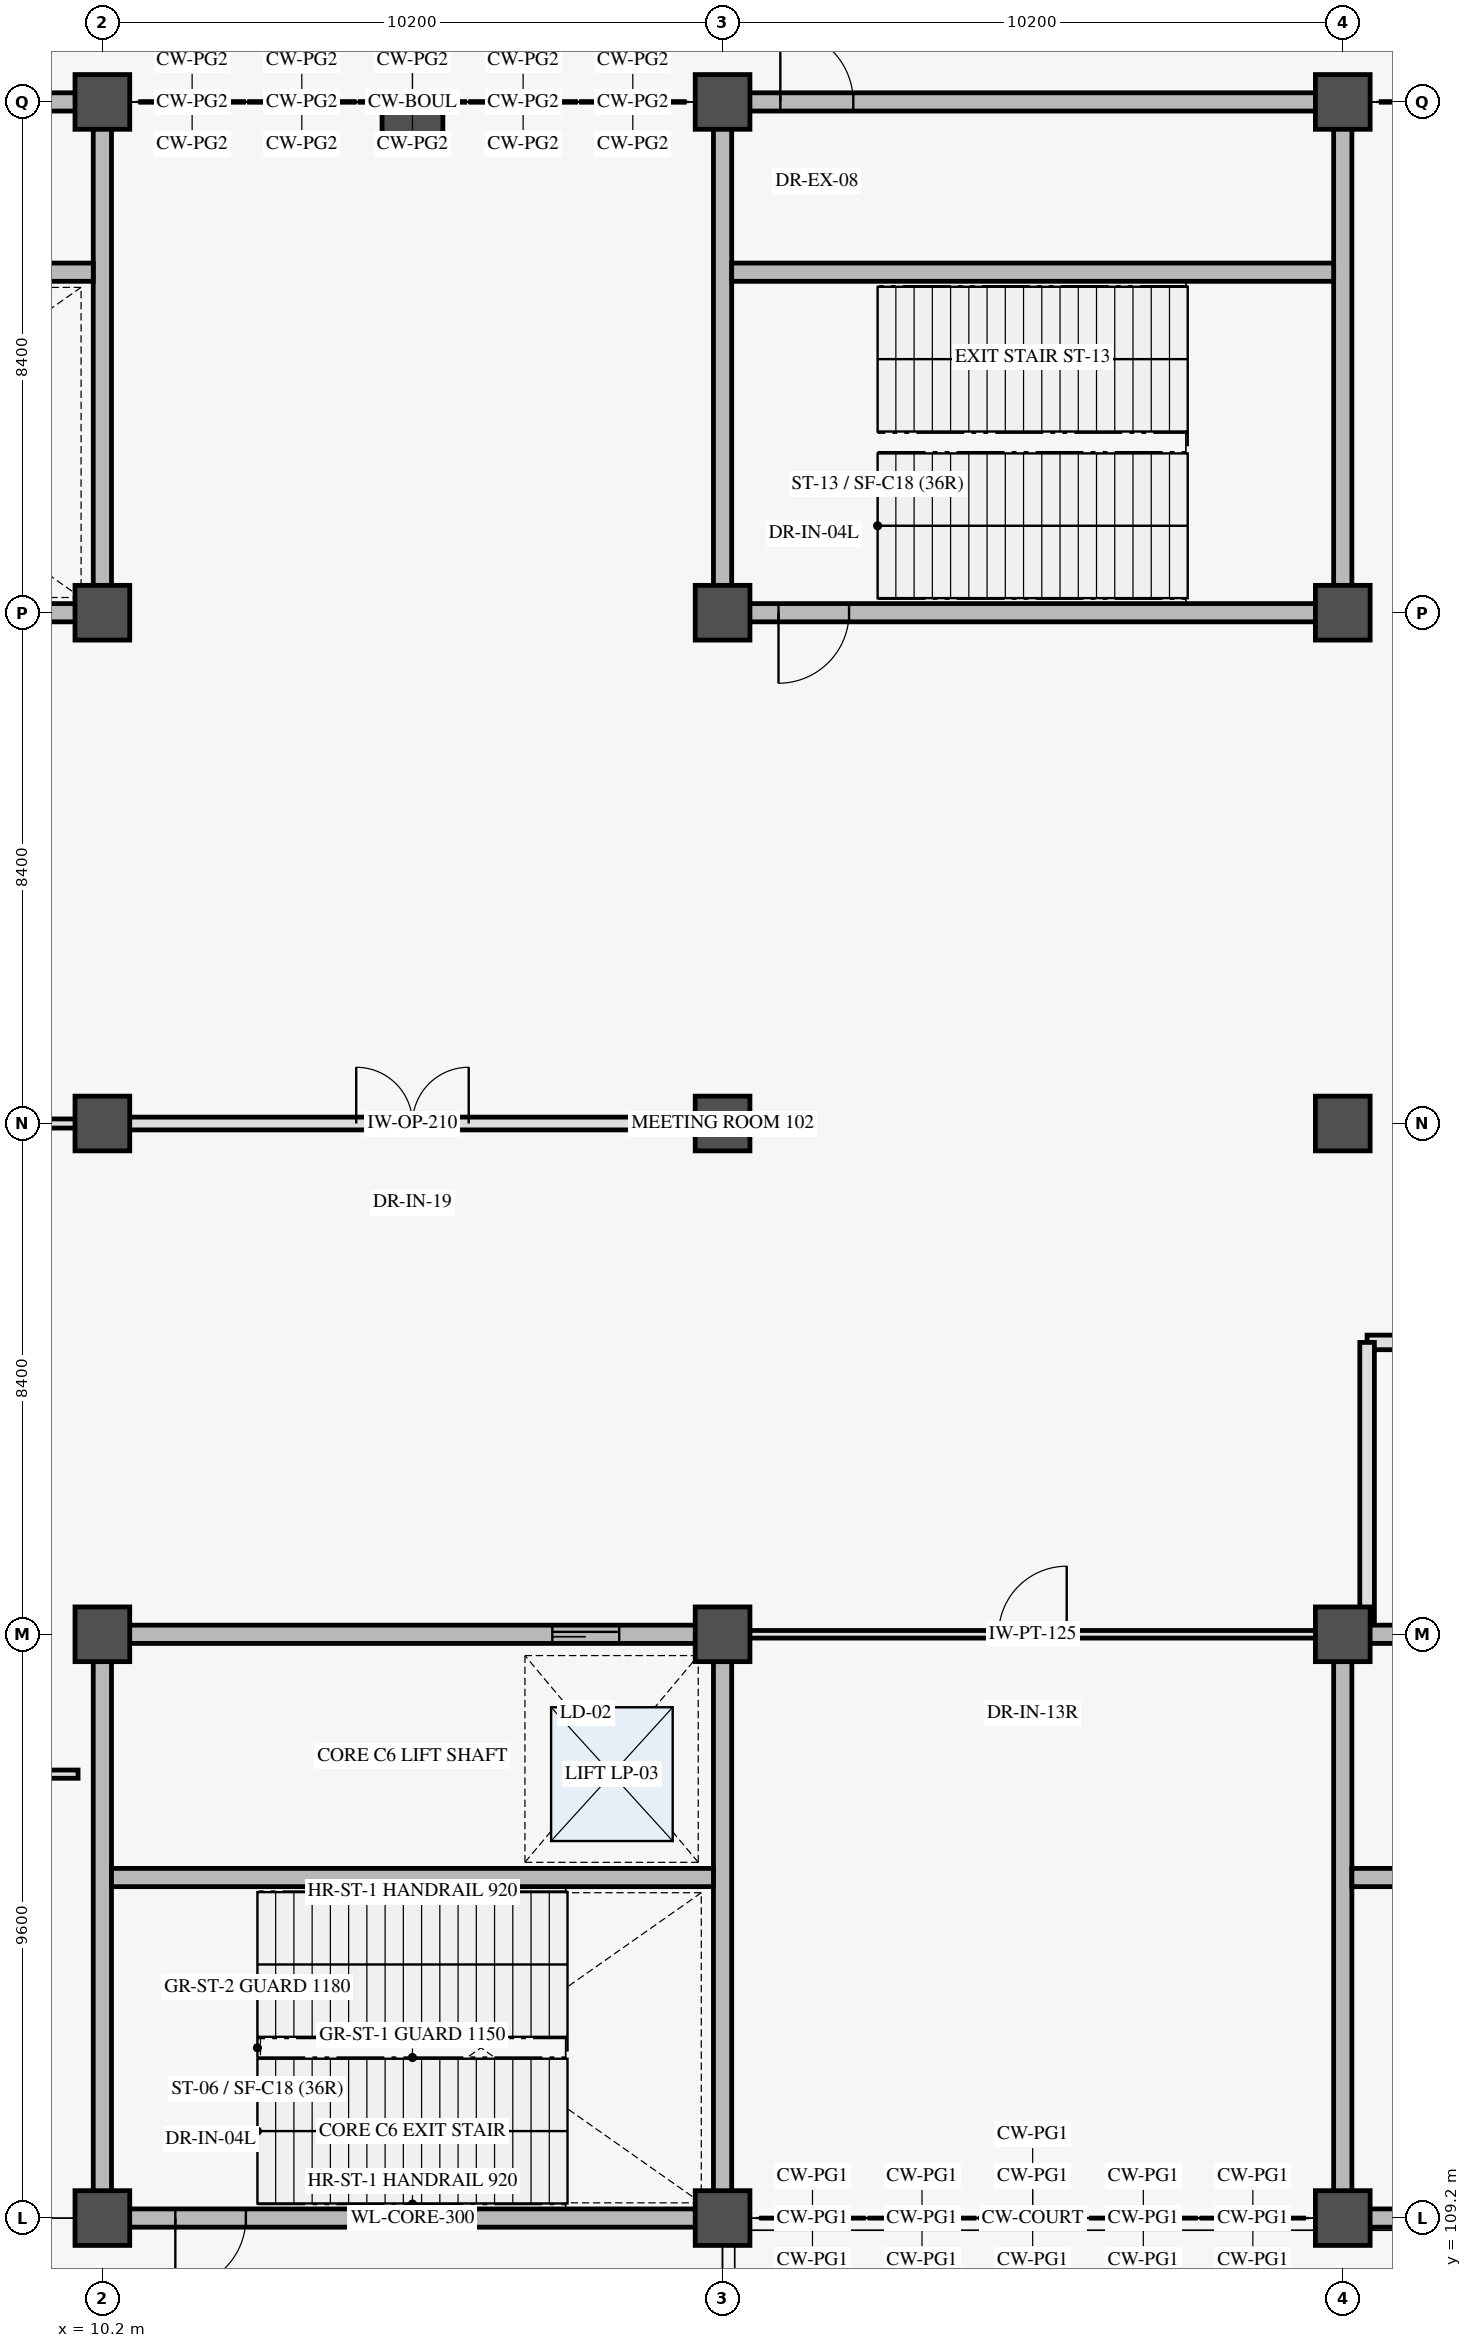
"""IFC4 building model, lengths in metres.
Left out: names, types, materials, properties, quantities, classifications, styles, units other than length and angle.
Written with IfcOpenShell. Run it as: python <this file> out.ifc"""

import sys

from ifc_helpers import new_model, si_unit, direction, frame, frame_2d, origin, origin_2d, place, context, subcontext, project, spatial, rectangle, extrude, element, fill, save


model = new_model("IFC4")
c1 = context("Model", 3, precision=1e-05, world=origin(), true_north=direction((0.0, 1.0)))
c2 = subcontext(c1, "Body", "Model", "MODEL_VIEW")
j1 = project(units=[si_unit("LENGTHUNIT", "METRE"), si_unit("PLANEANGLEUNIT", "RADIAN")], contexts=[c1])
p1 = place(None, origin())
s1 = spatial("IfcSite", under=j1, at=p1, CompositionType="ELEMENT")
p2 = place(p1, origin())
s2 = spatial("IfcBuilding", under=s1, at=p2, CompositionType="ELEMENT")
p3 = place(p2, origin())
s3 = spatial("IfcBuildingStorey", under=s2, at=p3, CompositionType="ELEMENT", Elevation=0.0)
for number, where, z_axis, x_axis in (
    (1, (10.2, 109.2, 0.0), (0.0, 0.0, 1.0), (1.0, 0.0, 0.0)),
    (2, (10.2, 118.8, 0.0), (0.0, 0.0, 1.0), (1.0, 0.0, 0.0)),
    (3, (10.2, 127.2, 0.0), (0.0, 0.0, 1.0), (1.0, 0.0, 0.0)),
    (4, (10.2, 135.6, 0.0), (0.0, 0.0, 1.0), (1.0, 0.0, 0.0)),
    (5, (10.2, 144.0, 0.0), (0.0, 0.0, 1.0), (1.0, 0.0, 0.0)),
    (6, (20.4, 109.2, 0.0), (0.0, 0.0, 1.0), (1.0, 0.0, 0.0)),
    (7, (20.4, 118.8, 0.0), (0.0, 0.0, 1.0), (1.0, 0.0, 0.0)),
    (8, (20.4, 127.2, 0.0), (0.0, 0.0, 1.0), (1.0, 0.0, 0.0)),
    (9, (20.4, 135.6, 0.0), (0.0, 0.0, 1.0), (1.0, 0.0, 0.0)),
    (10, (20.4, 144.0, 0.0), (0.0, 0.0, 1.0), (1.0, 0.0, 0.0)),
    (11, (30.6, 109.2, 0.0), (0.0, 0.0, 1.0), (1.0, 0.0, 0.0)),
    (12, (30.6, 118.8, 0.0), (0.0, 0.0, 1.0), (1.0, 0.0, 0.0)),
    (13, (30.6, 127.2, 0.0), (0.0, 0.0, 1.0), (1.0, 0.0, 0.0)),
    (14, (30.6, 135.6, 0.0), (0.0, 0.0, 1.0), (1.0, 0.0, 0.0)),
    (15, (30.6, 144.0, 0.0), (0.0, 0.0, 1.0), (1.0, 0.0, 0.0)),
):
    element("IfcColumn", number, at=place(p3, frame(where, z_axis=z_axis, x_axis=x_axis)), inside=s3, PredefinedType="COLUMN", context=c2, shape_type="SweptSolid", body=[
        extrude(rectangle(XDim=0.9, YDim=0.9, at=origin_2d()), origin(), (0.0, 0.0, 1.0), 5.4),
    ])
p4 = place(p3, frame((15.3, 143.7, 0.0), z_axis=(0.0, 0.0, 1.0), x_axis=(1.0, 0.0, 0.0)))
e16 = element("IfcColumn", 16, at=p4, inside=s3, PredefinedType="PILASTER", context=c2, shape_type="SweptSolid", body=[
    extrude(rectangle(XDim=1.0, YDim=0.6, at=origin_2d()), origin(), (0.0, 0.0, 1.0), 5.4),
])
p5 = place(p3, frame((10.2, 109.2, 0.0), z_axis=(0.0, 0.0, 1.0), x_axis=(1.0, 0.0, 0.0)))
e17 = element("IfcWall", 17, at=p5, inside=s3, PredefinedType="SHEAR", context=c2, shape_type="SweptSolid", body=[
    extrude(rectangle(XDim=10.2, YDim=0.3, at=frame_2d((5.1, 0.0))), origin(), (0.0, 0.0, 1.0), 5.4),
])
p6 = place(p5, frame((1.2, 0.0, 0.0)))
e18 = element("IfcOpeningElement", 18, at=p6, cuts=e17, PredefinedType="OPENING", context=c2, shape_type="SweptSolid", body=[
    extrude(rectangle(XDim=1.16, YDim=2.2, at=frame_2d((0.58, 1.1))), frame((0.0, 0.16, 0.0), z_axis=(0.0, -1.0, 0.0), x_axis=(1.0, 0.0, 0.0)), (0.0, 0.0, 1.0), 0.32),
])
p7 = place(p3, frame((10.2, 118.8, 0.0), z_axis=(0.0, 0.0, 1.0), x_axis=(1.0, 0.0, 0.0)))
e19 = element("IfcWall", 19, at=p7, inside=s3, PredefinedType="SHEAR", context=c2, shape_type="SweptSolid", body=[
    extrude(rectangle(XDim=10.2, YDim=0.3, at=frame_2d((5.1, 0.0))), origin(), (0.0, 0.0, 1.0), 5.4),
])
p8 = place(p7, frame((7.4, 0.0, 0.0)))
e20 = element("IfcOpeningElement", 20, at=p8, cuts=e19, PredefinedType="OPENING", context=c2, shape_type="SweptSolid", body=[
    extrude(rectangle(XDim=1.1, YDim=2.2, at=frame_2d((0.55, 1.1))), frame((0.0, 0.16, 0.0), z_axis=(0.0, -1.0, 0.0), x_axis=(1.0, 0.0, 0.0)), (0.0, 0.0, 1.0), 0.32),
])
for number, where, z_axis, x_axis in (
    (21, (10.2, 109.2, 0.0), (0.0, 0.0, 1.0), (0.0, 1.0, 0.0)),
    (22, (20.4, 109.2, 0.0), (0.0, 0.0, 1.0), (0.0, 1.0, 0.0)),
):
    element("IfcWall", number, at=place(p3, frame(where, z_axis=z_axis, x_axis=x_axis)), inside=s3, PredefinedType="SHEAR", context=c2, shape_type="SweptSolid", body=[
        extrude(rectangle(XDim=9.6, YDim=0.3, at=frame_2d((4.8, 0.0))), origin(), (0.0, 0.0, 1.0), 5.4),
    ])
p9 = place(p3, frame((30.6, 109.2, 0.0), z_axis=(0.0, 0.0, 1.0), x_axis=(1.0, 0.0, 0.0)))
e23 = element("IfcWall", 23, at=p9, inside=s3, PredefinedType="SHEAR", context=c2, shape_type="SweptSolid", body=[
    extrude(rectangle(XDim=10.2, YDim=0.3, at=frame_2d((5.1, 0.0))), origin(), (0.0, 0.0, 1.0), 5.4),
])
p10 = place(p9, frame((1.2, 0.0, 0.0)))
e24 = element("IfcOpeningElement", 24, at=p10, cuts=e23, PredefinedType="OPENING", context=c2, shape_type="SweptSolid", body=[
    extrude(rectangle(XDim=1.16, YDim=2.2, at=frame_2d((0.58, 1.1))), frame((0.0, 0.16, 0.0), z_axis=(0.0, -1.0, 0.0), x_axis=(1.0, 0.0, 0.0)), (0.0, 0.0, 1.0), 0.32),
])
p11 = place(p3, frame((30.6, 118.8, 0.0), z_axis=(0.0, 0.0, 1.0), x_axis=(1.0, 0.0, 0.0)))
e25 = element("IfcWall", 25, at=p11, inside=s3, PredefinedType="SHEAR", context=c2, shape_type="SweptSolid", body=[
    extrude(rectangle(XDim=10.2, YDim=0.3, at=frame_2d((5.1, 0.0))), origin(), (0.0, 0.0, 1.0), 5.4),
])
p12 = place(p11, frame((7.4, 0.0, 0.0)))
e26 = element("IfcOpeningElement", 26, at=p12, cuts=e25, PredefinedType="OPENING", context=c2, shape_type="SweptSolid", body=[
    extrude(rectangle(XDim=1.2, YDim=2.25, at=frame_2d((0.6, 1.125))), frame((0.0, 0.16, 0.0), z_axis=(0.0, -1.0, 0.0), x_axis=(1.0, 0.0, 0.0)), (0.0, 0.0, 1.0), 0.32),
])
p13 = place(p3, frame((30.6, 109.2, 0.0), z_axis=(0.0, 0.0, 1.0), x_axis=(0.0, 1.0, 0.0)))
e27 = element("IfcWall", 27, at=p13, inside=s3, PredefinedType="SHEAR", context=c2, shape_type="SweptSolid", body=[
    extrude(rectangle(XDim=9.6, YDim=0.3, at=frame_2d((4.8, 0.0))), origin(), (0.0, 0.0, 1.0), 5.4),
])
for number, where, z_axis, x_axis in (
    (28, (10.35, 114.8, 0.0), (0.0, 0.0, 1.0), (1.0, 0.0, 0.0)),
    (29, (30.75, 114.8, 0.0), (0.0, 0.0, 1.0), (1.0, 0.0, 0.0)),
):
    element("IfcWall", number, at=place(p3, frame(where, z_axis=z_axis, x_axis=x_axis)), inside=s3, PredefinedType="SHEAR", context=c2, shape_type="SweptSolid", body=[
        extrude(rectangle(XDim=9.9, YDim=0.3, at=frame_2d((4.95, 0.0))), origin(), (0.0, 0.0, 1.0), 5.4),
    ])
p14 = place(p3, frame((20.4, 135.6, 0.0), z_axis=(0.0, 0.0, 1.0), x_axis=(1.0, 0.0, 0.0)))
e30 = element("IfcWall", 30, at=p14, inside=s3, PredefinedType="SHEAR", context=c2, shape_type="SweptSolid", body=[
    extrude(rectangle(XDim=10.2, YDim=0.3, at=frame_2d((5.1, 0.0))), origin(), (0.0, 0.0, 1.0), 5.4),
])
p15 = place(p14, frame((0.92, 0.0, 0.0)))
e31 = element("IfcOpeningElement", 31, at=p15, cuts=e30, PredefinedType="OPENING", context=c2, shape_type="SweptSolid", body=[
    extrude(rectangle(XDim=1.16, YDim=2.2, at=frame_2d((0.58, 1.1))), frame((0.0, 0.16, 0.0), z_axis=(0.0, -1.0, 0.0), x_axis=(1.0, 0.0, 0.0)), (0.0, 0.0, 1.0), 0.32),
])
p16 = place(p3, frame((20.4, 144.0, 0.0), z_axis=(0.0, 0.0, 1.0), x_axis=(1.0, 0.0, 0.0)))
e32 = element("IfcWall", 32, at=p16, inside=s3, PredefinedType="SHEAR", context=c2, shape_type="SweptSolid", body=[
    extrude(rectangle(XDim=10.2, YDim=0.3, at=frame_2d((5.1, 0.0))), origin(), (0.0, 0.0, 1.0), 5.4),
])
p17 = place(p16, frame((0.95, 0.0, 0.0)))
e33 = element("IfcOpeningElement", 33, at=p17, cuts=e32, PredefinedType="OPENING", context=c2, shape_type="SweptSolid", body=[
    extrude(rectangle(XDim=1.2, YDim=2.2, at=frame_2d((0.6, 1.1))), frame((0.0, 0.16, 0.0), z_axis=(0.0, -1.0, 0.0), x_axis=(1.0, 0.0, 0.0)), (0.0, 0.0, 1.0), 0.32),
])
for number, where, z_axis, x_axis in (
    (34, (20.4, 135.6, 0.0), (0.0, 0.0, 1.0), (0.0, 1.0, 0.0)),
    (35, (30.6, 135.6, 0.0), (0.0, 0.0, 1.0), (0.0, 1.0, 0.0)),
):
    element("IfcWall", number, at=place(p3, frame(where, z_axis=z_axis, x_axis=x_axis)), inside=s3, PredefinedType="SHEAR", context=c2, shape_type="SweptSolid", body=[
        extrude(rectangle(XDim=8.4, YDim=0.3, at=frame_2d((4.2, 0.0))), origin(), (0.0, 0.0, 1.0), 5.4),
    ])
p18 = place(p3, frame((20.55, 141.2, 0.0), z_axis=(0.0, 0.0, 1.0), x_axis=(1.0, 0.0, 0.0)))
e36 = element("IfcWall", 36, at=p18, inside=s3, PredefinedType="SHEAR", context=c2, shape_type="SweptSolid", body=[
    extrude(rectangle(XDim=9.9, YDim=0.3, at=frame_2d((4.95, 0.0))), origin(), (0.0, 0.0, 1.0), 5.4),
])
p19 = place(p3, frame((0.0, 135.6, 0.0), z_axis=(0.0, 0.0, 1.0), x_axis=(1.0, 0.0, 0.0)))
e37 = element("IfcWall", 37, at=p19, inside=s3, PredefinedType="SHEAR", context=c2, shape_type="SweptSolid", body=[
    extrude(rectangle(XDim=10.2, YDim=0.3, at=frame_2d((5.1, 0.0))), origin(), (0.0, 0.0, 1.0), 5.4),
])
p20 = place(p19, frame((0.92, 0.0, 0.0)))
e38 = element("IfcOpeningElement", 38, at=p20, cuts=e37, PredefinedType="OPENING", context=c2, shape_type="SweptSolid", body=[
    extrude(rectangle(XDim=1.16, YDim=2.2, at=frame_2d((0.58, 1.1))), frame((0.0, 0.16, 0.0), z_axis=(0.0, -1.0, 0.0), x_axis=(1.0, 0.0, 0.0)), (0.0, 0.0, 1.0), 0.32),
])
p21 = place(p3, frame((0.0, 144.0, 0.0), z_axis=(0.0, 0.0, 1.0), x_axis=(1.0, 0.0, 0.0)))
e39 = element("IfcWall", 39, at=p21, inside=s3, PredefinedType="SHEAR", context=c2, shape_type="SweptSolid", body=[
    extrude(rectangle(XDim=10.2, YDim=0.3, at=frame_2d((5.1, 0.0))), origin(), (0.0, 0.0, 1.0), 5.4),
])
p22 = place(p21, frame((0.95, 0.0, 0.0)))
e40 = element("IfcOpeningElement", 40, at=p22, cuts=e39, PredefinedType="OPENING", context=c2, shape_type="SweptSolid", body=[
    extrude(rectangle(XDim=1.2, YDim=2.2, at=frame_2d((0.6, 1.1))), frame((0.0, 0.16, 0.0), z_axis=(0.0, -1.0, 0.0), x_axis=(1.0, 0.0, 0.0)), (0.0, 0.0, 1.0), 0.32),
])
p23 = place(p3, frame((10.2, 135.6, 0.0), z_axis=(0.0, 0.0, 1.0), x_axis=(0.0, 1.0, 0.0)))
e41 = element("IfcWall", 41, at=p23, inside=s3, PredefinedType="SHEAR", context=c2, shape_type="SweptSolid", body=[
    extrude(rectangle(XDim=8.4, YDim=0.3, at=frame_2d((4.2, 0.0))), origin(), (0.0, 0.0, 1.0), 5.4),
])
p24 = place(p3, frame((0.15, 141.2, 0.0), z_axis=(0.0, 0.0, 1.0), x_axis=(1.0, 0.0, 0.0)))
e42 = element("IfcWall", 42, at=p24, inside=s3, PredefinedType="SHEAR", context=c2, shape_type="SweptSolid", body=[
    extrude(rectangle(XDim=9.9, YDim=0.3, at=frame_2d((4.95, 0.0))), origin(), (0.0, 0.0, 1.0), 5.4),
])
p25 = place(p3, frame((31.0, 123.6, 0.0), z_axis=(0.0, 0.0, 1.0), x_axis=(1.0, 0.0, 0.0)))
e43 = element("IfcWall", 43, at=p25, inside=s3, PredefinedType="PARTITIONING", context=c2, shape_type="SweptSolid", body=[
    extrude(rectangle(XDim=9.4, YDim=0.24, at=frame_2d((4.7, 0.0))), origin(), (0.0, 0.0, 1.0), 4.08),
])
p26 = place(p25, frame((3.75, 0.0, 0.0)))
e44 = element("IfcOpeningElement", 44, at=p26, cuts=e43, PredefinedType="OPENING", context=c2, shape_type="SweptSolid", body=[
    extrude(rectangle(XDim=1.9, YDim=2.25, at=frame_2d((0.95, 1.125))), frame((0.0, 0.13, 0.0), z_axis=(0.0, -1.0, 0.0), x_axis=(1.0, 0.0, 0.0)), (0.0, 0.0, 1.0), 0.26),
])
p27 = place(p3, frame((31.0, 119.0, 0.0), z_axis=(0.0, 0.0, 1.0), x_axis=(0.0, 1.0, 0.0)))
e45 = element("IfcWall", 45, at=p27, inside=s3, PredefinedType="PARTITIONING", context=c2, shape_type="SweptSolid", body=[
    extrude(rectangle(XDim=4.6, YDim=0.24, at=frame_2d((2.3, 0.0))), origin(), (0.0, 0.0, 1.0), 4.08),
])
p28 = place(p3, frame((0.4, 127.2, 0.0), z_axis=(0.0, 0.0, 1.0), x_axis=(1.0, 0.0, 0.0)))
e46 = element("IfcWall", 46, at=p28, inside=s3, PredefinedType="MOVABLE", context=c2, shape_type="SweptSolid", body=[
    extrude(rectangle(XDim=9.4, YDim=0.15, at=frame_2d((4.7, 0.0))), origin(), (0.0, 0.0, 1.0), 4.08),
])
p29 = place(p28, frame((3.825, 0.0, 0.0)))
e47 = element("IfcOpeningElement", 47, at=p29, cuts=e46, PredefinedType="OPENING", context=c2, shape_type="SweptSolid", body=[
    extrude(rectangle(XDim=1.75, YDim=2.28, at=frame_2d((0.875, 1.14))), frame((0.0, 0.085, 0.0), z_axis=(0.0, -1.0, 0.0), x_axis=(1.0, 0.0, 0.0)), (0.0, 0.0, 1.0), 0.17),
])
p30 = place(p3, frame((10.6, 127.2, 0.0), z_axis=(0.0, 0.0, 1.0), x_axis=(1.0, 0.0, 0.0)))
e48 = element("IfcWall", 48, at=p30, inside=s3, PredefinedType="MOVABLE", context=c2, shape_type="SweptSolid", body=[
    extrude(rectangle(XDim=9.4, YDim=0.21, at=frame_2d((4.7, 0.0))), origin(), (0.0, 0.0, 1.0), 4.08),
])
p31 = place(p30, frame((3.775, 0.0, 0.0)))
e49 = element("IfcOpeningElement", 49, at=p31, cuts=e48, PredefinedType="OPENING", context=c2, shape_type="SweptSolid", body=[
    extrude(rectangle(XDim=1.85, YDim=2.32, at=frame_2d((0.925, 1.16))), frame((0.0, 0.115, 0.0), z_axis=(0.0, -1.0, 0.0), x_axis=(1.0, 0.0, 0.0)), (0.0, 0.0, 1.0), 0.23),
])
p32 = place(p3, frame((0.4, 116.5, 0.0), z_axis=(0.0, 0.0, 1.0), x_axis=(1.0, 0.0, 0.0)))
e50 = element("IfcWall", 50, at=p32, inside=s3, PredefinedType="PARTITIONING", context=c2, shape_type="SweptSolid", body=[
    extrude(rectangle(XDim=9.4, YDim=0.135, at=frame_2d((4.7, 0.0))), origin(), (0.0, 0.0, 1.0), 4.08),
])
p33 = place(p32, frame((4.16, 0.0, 0.0)))
e51 = element("IfcOpeningElement", 51, at=p33, cuts=e50, PredefinedType="OPENING", context=c2, shape_type="SweptSolid", body=[
    extrude(rectangle(XDim=1.08, YDim=2.18, at=frame_2d((0.54, 1.09))), frame((0.0, 0.077, 0.0), z_axis=(0.0, -1.0, 0.0), x_axis=(1.0, 0.0, 0.0)), (0.0, 0.0, 1.0), 0.155),
])
p34 = place(p3, frame((20.8, 118.8, 0.0), z_axis=(0.0, 0.0, 1.0), x_axis=(1.0, 0.0, 0.0)))
e52 = element("IfcWall", 52, at=p34, inside=s3, PredefinedType="PARTITIONING", context=c2, shape_type="SweptSolid", body=[
    extrude(rectangle(XDim=9.4, YDim=0.125, at=frame_2d((4.7, 0.0))), origin(), (0.0, 0.0, 1.0), 4.08),
])
p35 = place(p34, frame((4.14, 0.0, 0.0)))
e53 = element("IfcOpeningElement", 53, at=p35, cuts=e52, PredefinedType="OPENING", context=c2, shape_type="SweptSolid", body=[
    extrude(rectangle(XDim=1.12, YDim=2.18, at=frame_2d((0.56, 1.09))), frame((0.0, 0.073, 0.0), z_axis=(0.0, -1.0, 0.0), x_axis=(1.0, 0.0, 0.0)), (0.0, 0.0, 1.0), 0.145),
])
p36 = place(p6, frame((1.16, 0.0, 0.0), z_axis=(0.0, 0.0, 1.0), x_axis=(-1.0, 0.0, 0.0)))
e54 = element("IfcDoor", 54, at=p36, inside=s3, OperationType="SINGLE_SWING_LEFT", PredefinedType="DOOR", context=c2, shape_type="SweptSolid", body=[
    extrude(rectangle(XDim=1.16, YDim=2.2, at=frame_2d((0.58, 1.1))), frame((0.0, 0.025, 0.0), z_axis=(0.0, -1.0, 0.0), x_axis=(1.0, 0.0, 0.0)), (0.0, 0.0, 1.0), 0.05),
])
fill(e18, e54)
p37 = place(p8, origin())
e55 = element("IfcDoor", 55, at=p37, inside=s3, OperationType="SLIDING_TO_RIGHT", PredefinedType="DOOR", context=c2, shape_type="SweptSolid", body=[
    extrude(rectangle(XDim=1.1, YDim=2.2, at=frame_2d((0.55, 1.1))), frame((0.0, 0.025, 0.0), z_axis=(0.0, -1.0, 0.0), x_axis=(1.0, 0.0, 0.0)), (0.0, 0.0, 1.0), 0.05),
])
fill(e20, e55)
p38 = place(p15, origin())
e56 = element("IfcDoor", 56, at=p38, inside=s3, OperationType="SINGLE_SWING_LEFT", PredefinedType="DOOR", context=c2, shape_type="SweptSolid", body=[
    extrude(rectangle(XDim=1.16, YDim=2.2, at=frame_2d((0.58, 1.1))), frame((0.0, 0.025, 0.0), z_axis=(0.0, -1.0, 0.0), x_axis=(1.0, 0.0, 0.0)), (0.0, 0.0, 1.0), 0.05),
])
fill(e31, e56)
p39 = place(p17, origin())
e57 = element("IfcDoor", 57, at=p39, inside=s3, OperationType="SINGLE_SWING_LEFT", PredefinedType="DOOR", context=c2, shape_type="SweptSolid", body=[
    extrude(rectangle(XDim=1.2, YDim=2.2, at=frame_2d((0.6, 1.1))), frame((0.0, 0.025, 0.0), z_axis=(0.0, -1.0, 0.0), x_axis=(1.0, 0.0, 0.0)), (0.0, 0.0, 1.0), 0.05),
])
fill(e33, e57)
p40 = place(p31, origin())
e58 = element("IfcDoor", 58, at=p40, inside=s3, OperationType="DOUBLE_DOOR_SINGLE_SWING", PredefinedType="DOOR", context=c2, shape_type="SweptSolid", body=[
    extrude(rectangle(XDim=1.85, YDim=2.32, at=frame_2d((0.925, 1.16))), frame((0.0, 0.025, 0.0), z_axis=(0.0, -1.0, 0.0), x_axis=(1.0, 0.0, 0.0)), (0.0, 0.0, 1.0), 0.05),
])
fill(e49, e58)
p41 = place(p35, origin())
e59 = element("IfcDoor", 59, at=p41, inside=s3, OperationType="SINGLE_SWING_RIGHT", PredefinedType="DOOR", context=c2, shape_type="SweptSolid", body=[
    extrude(rectangle(XDim=1.12, YDim=2.18, at=frame_2d((0.56, 1.09))), frame((0.0, 0.025, 0.0), z_axis=(0.0, -1.0, 0.0), x_axis=(1.0, 0.0, 0.0)), (0.0, 0.0, 1.0), 0.05),
])
fill(e53, e59)
save(model, sys.argv[1])
